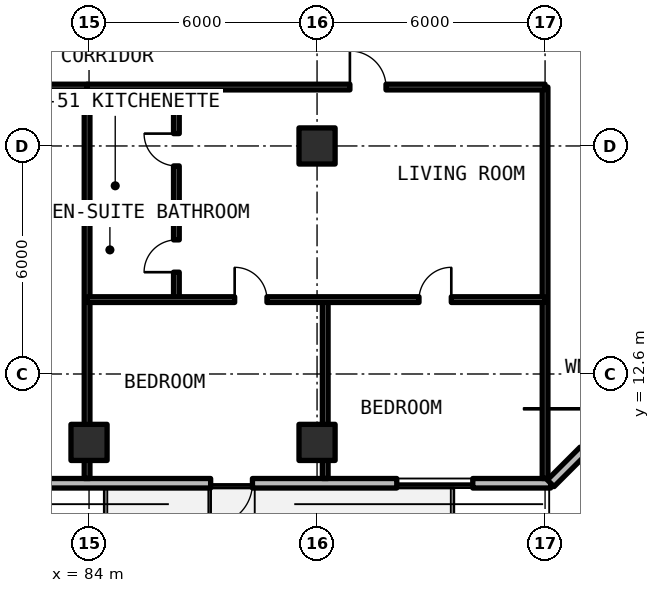
"""IFC4 building model, lengths in metres.
Left out: names, types, materials, properties, quantities, classifications, styles, units other than length and angle.
Written with IfcOpenShell. Run it as: python <this file> out.ifc"""

import sys

from ifc_helpers import new_model, si_unit, direction, frame, frame_2d, origin, origin_2d, place, context, subcontext, project, spatial, rectangle, extrude, element, fill, save


model = new_model("IFC4")
c1 = context("Model", 3, precision=1e-05, world=origin(), true_north=direction((0.0, 1.0)))
c2 = subcontext(c1, "Body", "Model", "MODEL_VIEW")
j1 = project(units=[si_unit("LENGTHUNIT", "METRE"), si_unit("PLANEANGLEUNIT", "RADIAN")], contexts=[c1])
p1 = place(None, origin())
s1 = spatial("IfcSite", under=j1, at=p1, CompositionType="ELEMENT")
p2 = place(p1, origin())
s2 = spatial("IfcBuilding", under=s1, at=p2, CompositionType="ELEMENT")
p3 = place(p2, frame((0.0, 0.0, 115.83)))
s3 = spatial("IfcBuildingStorey", under=s2, at=p3, CompositionType="ELEMENT", Elevation=115.83)
for number, where, z_axis, x_axis in (
    (1, (90.0, 18.6, 0.0), (0.0, 0.0, 1.0), (1.0, 0.0, 0.0)),
    (2, (84.0, 10.8, 0.0), (0.0, 0.0, 1.0), (1.0, 0.0, 0.0)),
    (3, (90.0, 10.8, 0.0), (0.0, 0.0, 1.0), (1.0, 0.0, 0.0)),
):
    element("IfcColumn", number, at=place(p3, frame(where, z_axis=z_axis, x_axis=x_axis)), inside=s3, PredefinedType="COLUMN", context=c2, shape_type="SweptSolid", body=[
        extrude(rectangle(XDim=0.95, YDim=0.95, at=origin_2d()), origin(), (0.0, 0.0, 1.0), 3.63),
    ])
p4 = place(p3, frame((52.125, 9.725, 0.0), z_axis=(0.0, 0.0, 1.0), x_axis=(1.0, 0.0, 0.0)))
e4 = element("IfcWall", 4, at=p4, inside=s3, PredefinedType="SOLIDWALL", context=c2, shape_type="SweptSolid", body=[
    extrude(rectangle(XDim=44.023, YDim=0.25, at=frame_2d((22.012, 0.0))), origin(), (0.0, 0.0, 1.0), 3.41),
])
p5 = place(p4, frame((10.875, 0.0, 0.0)))
e5 = element("IfcOpeningElement", 5, at=p5, cuts=e4, PredefinedType="OPENING", context=c2, shape_type="SweptSolid", body=[
    extrude(rectangle(XDim=1.1, YDim=2.15, at=frame_2d((0.55, 1.075))), frame((0.0, 0.135, 0.0), z_axis=(0.0, -1.0, 0.0), x_axis=(1.0, 0.0, 0.0)), (0.0, 0.0, 1.0), 0.27),
])
p6 = place(p4, frame((22.975, 0.0, 0.0)))
e6 = element("IfcOpeningElement", 6, at=p6, cuts=e4, PredefinedType="OPENING", context=c2, shape_type="SweptSolid", body=[
    extrude(rectangle(XDim=1.1, YDim=2.15, at=frame_2d((0.55, 1.075))), frame((0.0, 0.135, 0.0), z_axis=(0.0, -1.0, 0.0), x_axis=(1.0, 0.0, 0.0)), (0.0, 0.0, 1.0), 0.27),
])
p7 = place(p4, frame((35.075, 0.0, 0.0)))
e7 = element("IfcOpeningElement", 7, at=p7, cuts=e4, PredefinedType="OPENING", context=c2, shape_type="SweptSolid", body=[
    extrude(rectangle(XDim=1.1, YDim=2.15, at=frame_2d((0.55, 1.075))), frame((0.0, 0.135, 0.0), z_axis=(0.0, -1.0, 0.0), x_axis=(1.0, 0.0, 0.0)), (0.0, 0.0, 1.0), 0.27),
])
p8 = place(p4, frame((2.703, 0.0, 0.78)))
e8 = element("IfcOpeningElement", 8, at=p8, cuts=e4, PredefinedType="OPENING", context=c2, shape_type="SweptSolid", body=[
    extrude(rectangle(XDim=2.0, YDim=1.66, at=frame_2d((1.0, 0.83))), frame((0.0, 0.135, 0.0), z_axis=(0.0, -1.0, 0.0), x_axis=(1.0, 0.0, 0.0)), (0.0, 0.0, 1.0), 0.27),
])
p9 = place(p4, frame((39.973, 0.0, 0.78)))
e9 = element("IfcOpeningElement", 9, at=p9, cuts=e4, PredefinedType="OPENING", context=c2, shape_type="SweptSolid", body=[
    extrude(rectangle(XDim=2.0, YDim=1.66, at=frame_2d((1.0, 0.83))), frame((0.0, 0.135, 0.0), z_axis=(0.0, -1.0, 0.0), x_axis=(1.0, 0.0, 0.0)), (0.0, 0.0, 1.0), 0.27),
])
p10 = place(p3, frame((96.148, 9.725, 0.0), z_axis=(0.0, 0.0, 1.0), x_axis=(0.707106781187, 0.707106781187, 0.0)))
e10 = element("IfcWall", 10, at=p10, inside=s3, PredefinedType="SOLIDWALL", context=c2, shape_type="SweptSolid", body=[
    extrude(rectangle(XDim=5.836, YDim=0.25, at=frame_2d((2.918, 0.0))), origin(), (0.0, 0.0, 1.0), 3.41),
])
p11 = place(p10, frame((1.218, 0.0, 0.78)))
e11 = element("IfcOpeningElement", 11, at=p11, cuts=e10, PredefinedType="OPENING", context=c2, shape_type="SweptSolid", body=[
    extrude(rectangle(XDim=3.4, YDim=1.66, at=frame_2d((1.7, 0.83))), frame((0.0, 0.135, 0.0), z_axis=(0.0, -1.0, 0.0), x_axis=(1.0, 0.0, 0.0)), (0.0, 0.0, 1.0), 0.27),
])
for number, where, z_axis, x_axis in (
    (12, (96.0, 9.85, 0.0), (0.0, 0.0, 1.0), (0.0, 1.0, 0.0)),
    (13, (83.948, 9.85, 0.0), (0.0, 0.0, 1.0), (0.0, 1.0, 0.0)),
):
    element("IfcWall", number, at=place(p3, frame(where, z_axis=z_axis, x_axis=x_axis)), inside=s3, PredefinedType="SOLIDWALL", context=c2, shape_type="SweptSolid", body=[
        extrude(rectangle(XDim=10.3, YDim=0.15, at=frame_2d((5.15, 0.0))), origin(), (0.0, 0.0, 1.0), 2.63),
    ])
p12 = place(p3, frame((71.279, 20.15, 0.0), z_axis=(0.0, 0.0, 1.0), x_axis=(1.0, 0.0, 0.0)))
e14 = element("IfcWall", 14, at=p12, inside=s3, PredefinedType="SOLIDWALL", context=c2, shape_type="SweptSolid", body=[
    extrude(rectangle(XDim=12.67, YDim=0.15, at=frame_2d((6.335, 0.0))), origin(), (0.0, 0.0, 1.0), 2.63),
])
p13 = place(p12, frame((5.785, 0.0, 0.0)))
e15 = element("IfcOpeningElement", 15, at=p13, cuts=e14, PredefinedType="OPENING", context=c2, shape_type="SweptSolid", body=[
    extrude(rectangle(XDim=1.1, YDim=2.15, at=frame_2d((0.55, 1.075))), frame((0.0, 0.085, 0.0), z_axis=(0.0, -1.0, 0.0), x_axis=(1.0, 0.0, 0.0)), (0.0, 0.0, 1.0), 0.17),
])
p14 = place(p3, frame((83.948, 16.85, 0.0), z_axis=(0.0, 0.0, 1.0), x_axis=(1.0, 0.0, 0.0)))
e16 = element("IfcWall", 16, at=p14, inside=s3, PredefinedType="PARTITIONING", context=c2, shape_type="SweptSolid", body=[
    extrude(rectangle(XDim=2.35, YDim=0.15, at=frame_2d((1.175, 0.0))), origin(), (0.0, 0.0, 1.0), 2.63),
])
p15 = place(p3, frame((86.298, 14.557, 0.0), z_axis=(0.0, 0.0, 1.0), x_axis=(0.0, 1.0, 0.0)))
e17 = element("IfcWall", 17, at=p15, inside=s3, PredefinedType="PARTITIONING", context=c2, shape_type="SweptSolid", body=[
    extrude(rectangle(XDim=5.593, YDim=0.15, at=frame_2d((2.796, 0.0))), origin(), (0.0, 0.0, 1.0), 2.63),
])
p16 = place(p15, frame((0.721, 0.0, 0.0)))
e18 = element("IfcOpeningElement", 18, at=p16, cuts=e17, PredefinedType="OPENING", context=c2, shape_type="SweptSolid", body=[
    extrude(rectangle(XDim=0.85, YDim=2.1, at=frame_2d((0.425, 1.05))), frame((0.0, 0.085, 0.0), z_axis=(0.0, -1.0, 0.0), x_axis=(1.0, 0.0, 0.0)), (0.0, 0.0, 1.0), 0.17),
])
p17 = place(p15, frame((3.518, 0.0, 0.0)))
e19 = element("IfcOpeningElement", 19, at=p17, cuts=e17, PredefinedType="OPENING", context=c2, shape_type="SweptSolid", body=[
    extrude(rectangle(XDim=0.85, YDim=2.1, at=frame_2d((0.425, 1.05))), frame((0.0, 0.085, 0.0), z_axis=(0.0, -1.0, 0.0), x_axis=(1.0, 0.0, 0.0)), (0.0, 0.0, 1.0), 0.17),
])
p18 = place(p3, frame((90.215, 9.85, 0.0), z_axis=(0.0, 0.0, 1.0), x_axis=(0.0, 1.0, 0.0)))
e20 = element("IfcWall", 20, at=p18, inside=s3, PredefinedType="PARTITIONING", context=c2, shape_type="SweptSolid", body=[
    extrude(rectangle(XDim=4.707, YDim=0.15, at=frame_2d((2.354, 0.0))), origin(), (0.0, 0.0, 1.0), 2.63),
])
p19 = place(p3, frame((83.948, 14.557, 0.0), z_axis=(0.0, 0.0, 1.0), x_axis=(1.0, 0.0, 0.0)))
e21 = element("IfcWall", 21, at=p19, inside=s3, PredefinedType="PARTITIONING", context=c2, shape_type="SweptSolid", body=[
    extrude(rectangle(XDim=12.052, YDim=0.15, at=frame_2d((6.026, 0.0))), origin(), (0.0, 0.0, 1.0), 2.63),
])
p20 = place(p19, frame((3.883, 0.0, 0.0)))
e22 = element("IfcOpeningElement", 22, at=p20, cuts=e21, PredefinedType="OPENING", context=c2, shape_type="SweptSolid", body=[
    extrude(rectangle(XDim=0.85, YDim=2.1, at=frame_2d((0.425, 1.05))), frame((0.0, 0.085, 0.0), z_axis=(0.0, -1.0, 0.0), x_axis=(1.0, 0.0, 0.0)), (0.0, 0.0, 1.0), 0.17),
])
p21 = place(p19, frame((8.734, 0.0, 0.0)))
e23 = element("IfcOpeningElement", 23, at=p21, cuts=e21, PredefinedType="OPENING", context=c2, shape_type="SweptSolid", body=[
    extrude(rectangle(XDim=0.85, YDim=2.1, at=frame_2d((0.425, 1.05))), frame((0.0, 0.085, 0.0), z_axis=(0.0, -1.0, 0.0), x_axis=(1.0, 0.0, 0.0)), (0.0, 0.0, 1.0), 0.17),
])
p22 = place(p3, frame((83.948, 20.15, 0.0), z_axis=(0.0, 0.0, 1.0), x_axis=(1.0, 0.0, 0.0)))
e24 = element("IfcWall", 24, at=p22, inside=s3, PredefinedType="SOLIDWALL", context=c2, shape_type="SweptSolid", body=[
    extrude(rectangle(XDim=12.052, YDim=0.15, at=frame_2d((6.026, 0.0))), origin(), (0.0, 0.0, 1.0), 2.63),
])
p23 = place(p22, frame((6.916, 0.0, 0.0)))
e25 = element("IfcOpeningElement", 25, at=p23, cuts=e24, PredefinedType="OPENING", context=c2, shape_type="SweptSolid", body=[
    extrude(rectangle(XDim=0.95, YDim=2.15, at=frame_2d((0.475, 1.075))), frame((0.0, 0.085, 0.0), z_axis=(0.0, -1.0, 0.0), x_axis=(1.0, 0.0, 0.0)), (0.0, 0.0, 1.0), 0.17),
])
p24 = place(p7, frame((1.1, 0.0, 0.0), z_axis=(0.0, 0.0, 1.0), x_axis=(-1.0, 0.0, 0.0)))
e26 = element("IfcDoor", 26, at=p24, inside=s3, OperationType="SINGLE_SWING_LEFT", PredefinedType="DOOR", context=c2, shape_type="SweptSolid", body=[
    extrude(rectangle(XDim=1.1, YDim=2.15, at=frame_2d((0.55, 1.075))), frame((0.0, 0.025, 0.0), z_axis=(0.0, -1.0, 0.0), x_axis=(1.0, 0.0, 0.0)), (0.0, 0.0, 1.0), 0.05),
])
fill(e7, e26)
p25 = place(p9, origin())
e27 = element("IfcWindow", 27, at=p25, inside=s3, PartitioningType="SINGLE_PANEL", PredefinedType="WINDOW", context=c2, shape_type="SweptSolid", body=[
    extrude(rectangle(XDim=2.0, YDim=1.66, at=frame_2d((1.0, 0.83))), frame((0.0, 0.03, 0.0), z_axis=(0.0, -1.0, 0.0), x_axis=(1.0, 0.0, 0.0)), (0.0, 0.0, 1.0), 0.06),
])
fill(e9, e27)
p26 = place(p16, origin())
e28 = element("IfcDoor", 28, at=p26, inside=s3, OperationType="SINGLE_SWING_LEFT", PredefinedType="DOOR", context=c2, shape_type="SweptSolid", body=[
    extrude(rectangle(XDim=0.85, YDim=2.1, at=frame_2d((0.425, 1.05))), frame((0.0, 0.025, 0.0), z_axis=(0.0, -1.0, 0.0), x_axis=(1.0, 0.0, 0.0)), (0.0, 0.0, 1.0), 0.05),
])
fill(e18, e28)
p27 = place(p17, origin())
e29 = element("IfcDoor", 29, at=p27, inside=s3, OperationType="SINGLE_SWING_RIGHT", PredefinedType="DOOR", context=c2, shape_type="SweptSolid", body=[
    extrude(rectangle(XDim=0.85, YDim=2.1, at=frame_2d((0.425, 1.05))), frame((0.0, 0.025, 0.0), z_axis=(0.0, -1.0, 0.0), x_axis=(1.0, 0.0, 0.0)), (0.0, 0.0, 1.0), 0.05),
])
fill(e19, e29)
p28 = place(p20, origin())
e30 = element("IfcDoor", 30, at=p28, inside=s3, OperationType="SINGLE_SWING_LEFT", PredefinedType="DOOR", context=c2, shape_type="SweptSolid", body=[
    extrude(rectangle(XDim=0.85, YDim=2.1, at=frame_2d((0.425, 1.05))), frame((0.0, 0.025, 0.0), z_axis=(0.0, -1.0, 0.0), x_axis=(1.0, 0.0, 0.0)), (0.0, 0.0, 1.0), 0.05),
])
fill(e22, e30)
p29 = place(p21, origin())
e31 = element("IfcDoor", 31, at=p29, inside=s3, OperationType="SINGLE_SWING_RIGHT", PredefinedType="DOOR", context=c2, shape_type="SweptSolid", body=[
    extrude(rectangle(XDim=0.85, YDim=2.1, at=frame_2d((0.425, 1.05))), frame((0.0, 0.025, 0.0), z_axis=(0.0, -1.0, 0.0), x_axis=(1.0, 0.0, 0.0)), (0.0, 0.0, 1.0), 0.05),
])
fill(e23, e31)
p30 = place(p23, origin())
e32 = element("IfcDoor", 32, at=p30, inside=s3, OperationType="SINGLE_SWING_LEFT", PredefinedType="DOOR", context=c2, shape_type="SweptSolid", body=[
    extrude(rectangle(XDim=0.95, YDim=2.15, at=frame_2d((0.475, 1.075))), frame((0.0, 0.025, 0.0), z_axis=(0.0, -1.0, 0.0), x_axis=(1.0, 0.0, 0.0)), (0.0, 0.0, 1.0), 0.05),
])
fill(e25, e32)
save(model, sys.argv[1])
